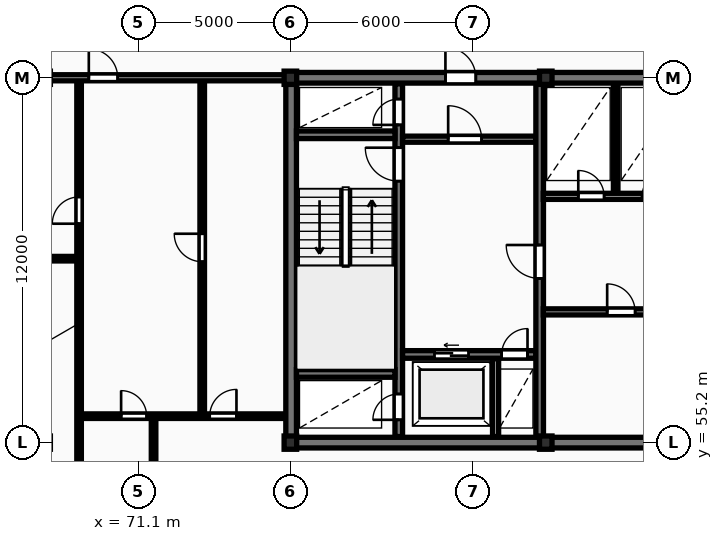
"""IFC4 building model, lengths in metres.
Left out: names, types, materials, properties, quantities, classifications, styles, units other than length and angle.
Written with IfcOpenShell. Run it as: python <this file> out.ifc"""

import sys

from ifc_helpers import new_model, si_unit, direction, frame, frame_2d, origin, origin_2d, place, context, subcontext, project, spatial, rectangle, i_section, extrude, element, fill, save


model = new_model("IFC4")
c1 = context("Model", 3, precision=1e-05, world=origin(), true_north=direction((0.0, 1.0)))
c2 = subcontext(c1, "Body", "Model", "MODEL_VIEW")
j1 = project(units=[si_unit("LENGTHUNIT", "METRE"), si_unit("PLANEANGLEUNIT", "RADIAN")], contexts=[c1])
p1 = place(None, origin())
s1 = spatial("IfcSite", under=j1, at=p1, CompositionType="ELEMENT")
p2 = place(p1, origin())
s2 = spatial("IfcBuilding", under=s1, at=p2, CompositionType="ELEMENT")
p3 = place(p2, frame((0.0, 0.0, 150.1)))
s3 = spatial("IfcBuildingStorey", under=s2, at=p3, CompositionType="ELEMENT", Elevation=150.1)
for number, where, z_axis, x_axis in (
    (1, (76.1, 55.2, 0.0), (0.0, 0.0, 1.0), (1.0, 0.0, 0.0)),
    (2, (76.1, 67.2, 0.0), (0.0, 0.0, 1.0), (1.0, 0.0, 0.0)),
    (3, (84.5, 55.2, 0.0), (0.0, 0.0, 1.0), (1.0, 0.0, 0.0)),
    (4, (84.5, 67.2, 0.0), (0.0, 0.0, 1.0), (1.0, 0.0, 0.0)),
):
    element("IfcColumn", number, at=place(p3, frame(where, z_axis=z_axis, x_axis=x_axis)), inside=s3, PredefinedType="COLUMN", context=c2, shape_type="SweptSolid", body=[
        extrude(i_section(OverallWidth=0.412, OverallDepth=0.437, WebThickness=0.036, FlangeThickness=0.052, FilletRadius=0.015, at=origin_2d()), origin(), (0.0, 0.0, 1.0), 3.6),
    ])
p4 = place(p3, frame((75.95, 55.2, 0.0), z_axis=(0.0, 0.0, 1.0), x_axis=(1.0, 0.0, 0.0)))
e5 = element("IfcWall", 5, at=p4, inside=s3, PredefinedType="SHEAR", context=c2, shape_type="SweptSolid", body=[
    extrude(rectangle(XDim=36.3, YDim=0.35, at=frame_2d((18.15, 0.0))), origin(), (0.0, 0.0, 1.0), 3.6),
])
p5 = place(p4, frame((15.1, 0.0, 0.0)))
e6 = element("IfcOpeningElement", 6, at=p5, cuts=e5, PredefinedType="OPENING", context=c2, shape_type="SweptSolid", body=[
    extrude(rectangle(XDim=1.1, YDim=2.1, at=frame_2d((0.55, 1.05))), frame((0.0, 0.185, 0.0), z_axis=(0.0, -1.0, 0.0), x_axis=(1.0, 0.0, 0.0)), (0.0, 0.0, 1.0), 0.37),
])
p6 = place(p3, frame((76.125, 55.375, 0.0), z_axis=(0.0, 0.0, 1.0), x_axis=(0.0, 1.0, 0.0)))
e7 = element("IfcWall", 7, at=p6, inside=s3, PredefinedType="SHEAR", context=c2, shape_type="SweptSolid", body=[
    extrude(rectangle(XDim=11.65, YDim=0.35, at=frame_2d((5.825, 0.0))), origin(), (0.0, 0.0, 1.0), 3.6),
])
p7 = place(p3, frame((75.95, 67.2, 0.0), z_axis=(0.0, 0.0, 1.0), x_axis=(1.0, 0.0, 0.0)))
e8 = element("IfcWall", 8, at=p7, inside=s3, PredefinedType="SHEAR", context=c2, shape_type="SweptSolid", body=[
    extrude(rectangle(XDim=36.3, YDim=0.35, at=frame_2d((18.15, 0.0))), origin(), (0.0, 0.0, 1.0), 3.6),
])
p8 = place(p7, frame((5.25, 0.0, 0.0)))
e9 = element("IfcOpeningElement", 9, at=p8, cuts=e8, PredefinedType="OPENING", context=c2, shape_type="SweptSolid", body=[
    extrude(rectangle(XDim=1.0, YDim=2.15, at=frame_2d((0.5, 1.075))), frame((0.0, 0.185, 0.0), z_axis=(0.0, -1.0, 0.0), x_axis=(1.0, 0.0, 0.0)), (0.0, 0.0, 1.0), 0.37),
])
p9 = place(p7, frame((21.6, 0.0, 0.0)))
e10 = element("IfcOpeningElement", 10, at=p9, cuts=e8, PredefinedType="OPENING", context=c2, shape_type="SweptSolid", body=[
    extrude(rectangle(XDim=1.5, YDim=2.2, at=frame_2d((0.75, 1.1))), frame((0.0, 0.185, 0.0), z_axis=(0.0, -1.0, 0.0), x_axis=(1.0, 0.0, 0.0)), (0.0, 0.0, 1.0), 0.37),
])
p10 = place(p7, frame((30.45, 0.0, 0.0)))
e11 = element("IfcOpeningElement", 11, at=p10, cuts=e8, PredefinedType="OPENING", context=c2, shape_type="SweptSolid", body=[
    extrude(rectangle(XDim=1.0, YDim=2.15, at=frame_2d((0.5, 1.075))), frame((0.0, 0.185, 0.0), z_axis=(0.0, -1.0, 0.0), x_axis=(1.0, 0.0, 0.0)), (0.0, 0.0, 1.0), 0.37),
])
p11 = place(p3, frame((79.665, 55.4, 0.0), z_axis=(0.0, 0.0, 1.0), x_axis=(0.0, 1.0, 0.0)))
e12 = element("IfcWall", 12, at=p11, inside=s3, PredefinedType="SHEAR", context=c2, shape_type="SweptSolid", body=[
    extrude(rectangle(XDim=11.6, YDim=0.25, at=frame_2d((5.8, 0.0))), origin(), (0.0, 0.0, 1.0), 3.6),
])
p12 = place(p11, frame((0.55, 0.0, 0.0)))
e13 = element("IfcOpeningElement", 13, at=p12, cuts=e12, PredefinedType="OPENING", context=c2, shape_type="SweptSolid", body=[
    extrude(rectangle(XDim=0.85, YDim=2.05, at=frame_2d((0.425, 1.025))), frame((0.0, 0.135, 0.0), z_axis=(0.0, -1.0, 0.0), x_axis=(1.0, 0.0, 0.0)), (0.0, 0.0, 1.0), 0.27),
])
p13 = place(p11, frame((8.4, 0.0, 0.0)))
e14 = element("IfcOpeningElement", 14, at=p13, cuts=e12, PredefinedType="OPENING", context=c2, shape_type="SweptSolid", body=[
    extrude(rectangle(XDim=1.1, YDim=2.1, at=frame_2d((0.55, 1.05))), frame((0.0, 0.135, 0.0), z_axis=(0.0, -1.0, 0.0), x_axis=(1.0, 0.0, 0.0)), (0.0, 0.0, 1.0), 0.27),
])
p14 = place(p11, frame((10.25, 0.0, 0.0)))
e15 = element("IfcOpeningElement", 15, at=p14, cuts=e12, PredefinedType="OPENING", context=c2, shape_type="SweptSolid", body=[
    extrude(rectangle(XDim=0.85, YDim=2.05, at=frame_2d((0.425, 1.025))), frame((0.0, 0.135, 0.0), z_axis=(0.0, -1.0, 0.0), x_axis=(1.0, 0.0, 0.0)), (0.0, 0.0, 1.0), 0.27),
])
for number, where, z_axis, x_axis in (
    (16, (76.3, 57.475, 0.0), (0.0, 0.0, 1.0), (1.0, 0.0, 0.0)),
    (17, (76.3, 65.325, 0.0), (0.0, 0.0, 1.0), (1.0, 0.0, 0.0)),
):
    element("IfcWall", number, at=place(p3, frame(where, z_axis=z_axis, x_axis=x_axis)), inside=s3, PredefinedType="SHEAR", context=c2, shape_type="SweptSolid", body=[
        extrude(rectangle(XDim=3.24, YDim=0.25, at=frame_2d((1.62, 0.0))), origin(), (0.0, 0.0, 1.0), 3.6),
    ])
p15 = place(p3, frame((79.79, 58.1, 0.0), z_axis=(0.0, 0.0, 1.0), x_axis=(1.0, 0.0, 0.0)))
e18 = element("IfcWall", 18, at=p15, inside=s3, PredefinedType="SHEAR", context=c2, shape_type="SweptSolid", body=[
    extrude(rectangle(XDim=4.39, YDim=0.25, at=frame_2d((2.195, 0.0))), origin(), (0.0, 0.0, 1.0), 3.6),
])
p16 = place(p15, frame((1.05, 0.0, 0.0)))
e19 = element("IfcOpeningElement", 19, at=p16, cuts=e18, PredefinedType="OPENING", context=c2, shape_type="SweptSolid", body=[
    extrude(rectangle(XDim=1.12, YDim=2.12, at=frame_2d((0.56, 1.06))), frame((0.0, 0.135, 0.0), z_axis=(0.0, -1.0, 0.0), x_axis=(1.0, 0.0, 0.0)), (0.0, 0.0, 1.0), 0.27),
])
p17 = place(p15, frame((3.26, 0.0, 0.0)))
e20 = element("IfcOpeningElement", 20, at=p17, cuts=e18, PredefinedType="OPENING", context=c2, shape_type="SweptSolid", body=[
    extrude(rectangle(XDim=0.85, YDim=2.05, at=frame_2d((0.425, 1.025))), frame((0.0, 0.135, 0.0), z_axis=(0.0, -1.0, 0.0), x_axis=(1.0, 0.0, 0.0)), (0.0, 0.0, 1.0), 0.27),
])
p18 = place(p3, frame((82.85, 55.4, 0.0), z_axis=(0.0, 0.0, 1.0), x_axis=(0.0, 1.0, 0.0)))
e21 = element("IfcWall", 21, at=p18, inside=s3, PredefinedType="PARTITIONING", context=c2, shape_type="SweptSolid", body=[
    extrude(rectangle(XDim=2.56, YDim=0.2, at=frame_2d((1.28, 0.0))), origin(), (0.0, 0.0, 1.0), 3.31),
])
p19 = place(p3, frame((79.79, 65.18, 0.0), z_axis=(0.0, 0.0, 1.0), x_axis=(1.0, 0.0, 0.0)))
e22 = element("IfcWall", 22, at=p19, inside=s3, PredefinedType="PARTITIONING", context=c2, shape_type="SweptSolid", body=[
    extrude(rectangle(XDim=4.39, YDim=0.2, at=frame_2d((2.195, 0.0))), origin(), (0.0, 0.0, 1.0), 3.31),
])
p20 = place(p19, frame((1.5, 0.0, 0.0)))
e23 = element("IfcOpeningElement", 23, at=p20, cuts=e22, PredefinedType="OPENING", context=c2, shape_type="SweptSolid", body=[
    extrude(rectangle(XDim=1.1, YDim=2.1, at=frame_2d((0.55, 1.05))), frame((0.0, 0.11, 0.0), z_axis=(0.0, -1.0, 0.0), x_axis=(1.0, 0.0, 0.0)), (0.0, 0.0, 1.0), 0.22),
])
p21 = place(p3, frame((84.3, 55.4, 0.0), z_axis=(0.0, 0.0, 1.0), x_axis=(0.0, 1.0, 0.0)))
e24 = element("IfcWall", 24, at=p21, inside=s3, PredefinedType="SHEAR", context=c2, shape_type="SweptSolid", body=[
    extrude(rectangle(XDim=11.6, YDim=0.25, at=frame_2d((5.8, 0.0))), origin(), (0.0, 0.0, 1.0), 3.6),
])
p22 = place(p21, frame((5.2, 0.0, 0.0)))
e25 = element("IfcOpeningElement", 25, at=p22, cuts=e24, PredefinedType="OPENING", context=c2, shape_type="SweptSolid", body=[
    extrude(rectangle(XDim=1.1, YDim=2.1, at=frame_2d((0.55, 1.05))), frame((0.0, 0.135, 0.0), z_axis=(0.0, -1.0, 0.0), x_axis=(1.0, 0.0, 0.0)), (0.0, 0.0, 1.0), 0.27),
])
p23 = place(p3, frame((84.42, 59.5, 0.0), z_axis=(0.0, 0.0, 1.0), x_axis=(1.0, 0.0, 0.0)))
e26 = element("IfcWall", 26, at=p23, inside=s3, PredefinedType="PARTITIONING", context=c2, shape_type="SweptSolid", body=[
    extrude(rectangle(XDim=8.36, YDim=0.2, at=frame_2d((4.18, 0.0))), origin(), (0.0, 0.0, 1.0), 3.31),
])
p24 = place(p23, frame((2.1, 0.0, 0.0)))
e27 = element("IfcOpeningElement", 27, at=p24, cuts=e26, PredefinedType="OPENING", context=c2, shape_type="SweptSolid", body=[
    extrude(rectangle(XDim=0.92, YDim=2.08, at=frame_2d((0.46, 1.04))), frame((0.0, 0.11, 0.0), z_axis=(0.0, -1.0, 0.0), x_axis=(1.0, 0.0, 0.0)), (0.0, 0.0, 1.0), 0.22),
])
p25 = place(p23, frame((6.38, 0.0, 0.0)))
e28 = element("IfcOpeningElement", 28, at=p25, cuts=e26, PredefinedType="OPENING", context=c2, shape_type="SweptSolid", body=[
    extrude(rectangle(XDim=1.1, YDim=2.1, at=frame_2d((0.55, 1.05))), frame((0.0, 0.11, 0.0), z_axis=(0.0, -1.0, 0.0), x_axis=(1.0, 0.0, 0.0)), (0.0, 0.0, 1.0), 0.22),
])
p26 = place(p3, frame((86.8, 63.4, 0.0), z_axis=(0.0, 0.0, 1.0), x_axis=(0.0, 1.0, 0.0)))
e29 = element("IfcWall", 29, at=p26, inside=s3, PredefinedType="PARTITIONING", context=c2, shape_type="SweptSolid", body=[
    extrude(rectangle(XDim=3.6, YDim=0.15, at=frame_2d((1.8, 0.0))), origin(), (0.0, 0.0, 1.0), 3.31),
])
p27 = place(p3, frame((84.42, 63.3, 0.0), z_axis=(0.0, 0.0, 1.0), x_axis=(1.0, 0.0, 0.0)))
e30 = element("IfcWall", 30, at=p27, inside=s3, PredefinedType="PARTITIONING", context=c2, shape_type="SweptSolid", body=[
    extrude(rectangle(XDim=19.83, YDim=0.2, at=frame_2d((9.915, 0.0))), origin(), (0.0, 0.0, 1.0), 3.31),
])
p28 = place(p27, frame((1.15, 0.0, 0.0)))
e31 = element("IfcOpeningElement", 31, at=p28, cuts=e30, PredefinedType="OPENING", context=c2, shape_type="SweptSolid", body=[
    extrude(rectangle(XDim=0.85, YDim=2.05, at=frame_2d((0.425, 1.025))), frame((0.0, 0.11, 0.0), z_axis=(0.0, -1.0, 0.0), x_axis=(1.0, 0.0, 0.0)), (0.0, 0.0, 1.0), 0.22),
])
p29 = place(p27, frame((3.25, 0.0, 0.0)))
e32 = element("IfcOpeningElement", 32, at=p29, cuts=e30, PredefinedType="OPENING", context=c2, shape_type="SweptSolid", body=[
    extrude(rectangle(XDim=0.85, YDim=2.05, at=frame_2d((0.425, 1.025))), frame((0.0, 0.11, 0.0), z_axis=(0.0, -1.0, 0.0), x_axis=(1.0, 0.0, 0.0)), (0.0, 0.0, 1.0), 0.22),
])
p30 = place(p27, frame((13.08, 0.0, 0.0)))
e33 = element("IfcOpeningElement", 33, at=p30, cuts=e30, PredefinedType="OPENING", context=c2, shape_type="SweptSolid", body=[
    extrude(rectangle(XDim=1.5, YDim=2.2, at=frame_2d((0.75, 1.1))), frame((0.0, 0.11, 0.0), z_axis=(0.0, -1.0, 0.0), x_axis=(1.0, 0.0, 0.0)), (0.0, 0.0, 1.0), 0.22),
])
p31 = place(p27, frame((5.53, 0.0, 0.0)))
e34 = element("IfcOpeningElement", 34, at=p31, cuts=e30, PredefinedType="OPENING", context=c2, shape_type="SweptSolid", body=[
    extrude(rectangle(XDim=0.88, YDim=2.06, at=frame_2d((0.44, 1.03))), frame((0.0, 0.11, 0.0), z_axis=(0.0, -1.0, 0.0), x_axis=(1.0, 0.0, 0.0)), (0.0, 0.0, 1.0), 0.22),
])
p32 = place(p27, frame((7.68, 0.0, 0.0)))
e35 = element("IfcOpeningElement", 35, at=p32, cuts=e30, PredefinedType="OPENING", context=c2, shape_type="SweptSolid", body=[
    extrude(rectangle(XDim=0.88, YDim=2.06, at=frame_2d((0.44, 1.03))), frame((0.0, 0.11, 0.0), z_axis=(0.0, -1.0, 0.0), x_axis=(1.0, 0.0, 0.0)), (0.0, 0.0, 1.0), 0.22),
])
p33 = place(p27, frame((10.43, 0.0, 0.0)))
e36 = element("IfcOpeningElement", 36, at=p33, cuts=e30, PredefinedType="OPENING", context=c2, shape_type="SweptSolid", body=[
    extrude(rectangle(XDim=0.85, YDim=2.05, at=frame_2d((0.425, 1.025))), frame((0.0, 0.11, 0.0), z_axis=(0.0, -1.0, 0.0), x_axis=(1.0, 0.0, 0.0)), (0.0, 0.0, 1.0), 0.22),
])
p34 = place(p27, frame((16.23, 0.0, 0.0)))
e37 = element("IfcOpeningElement", 37, at=p34, cuts=e30, PredefinedType="OPENING", context=c2, shape_type="SweptSolid", body=[
    extrude(rectangle(XDim=0.96, YDim=2.1, at=frame_2d((0.48, 1.05))), frame((0.0, 0.11, 0.0), z_axis=(0.0, -1.0, 0.0), x_axis=(1.0, 0.0, 0.0)), (0.0, 0.0, 1.0), 0.22),
])
p35 = place(p27, frame((18.68, 0.0, 0.0)))
e38 = element("IfcOpeningElement", 38, at=p35, cuts=e30, PredefinedType="OPENING", context=c2, shape_type="SweptSolid", body=[
    extrude(rectangle(XDim=0.84, YDim=2.04, at=frame_2d((0.42, 1.02))), frame((0.0, 0.11, 0.0), z_axis=(0.0, -1.0, 0.0), x_axis=(1.0, 0.0, 0.0)), (0.0, 0.0, 1.0), 0.22),
])
p36 = place(p3, frame((57.6, 61.25, 0.0), z_axis=(0.0, 0.0, 1.0), x_axis=(1.0, 0.0, 0.0)))
e39 = element("IfcWall", 39, at=p36, inside=s3, PredefinedType="PARTITIONING", context=c2, shape_type="SweptSolid", body=[
    extrude(rectangle(XDim=11.55, YDim=0.15, at=frame_2d((5.775, 0.0))), origin(), (0.0, 0.0, 1.0), 3.31),
])
p37 = place(p36, frame((5.355, 0.0, 0.0)))
e40 = element("IfcOpeningElement", 40, at=p37, cuts=e39, PredefinedType="OPENING", context=c2, shape_type="SweptSolid", body=[
    extrude(rectangle(XDim=0.84, YDim=2.04, at=frame_2d((0.42, 1.02))), frame((0.0, 0.085, 0.0), z_axis=(0.0, -1.0, 0.0), x_axis=(1.0, 0.0, 0.0)), (0.0, 0.0, 1.0), 0.17),
])
p38 = place(p3, frame((69.15, 51.1, 0.0), z_axis=(0.0, 0.0, 1.0), x_axis=(0.0, 1.0, 0.0)))
e41 = element("IfcWall", 41, at=p38, inside=s3, PredefinedType="PARTITIONING", context=c2, shape_type="SweptSolid", body=[
    extrude(rectangle(XDim=16.05, YDim=0.15, at=frame_2d((8.025, 0.0))), origin(), (0.0, 0.0, 1.0), 3.31),
])
p39 = place(p38, frame((11.3, 0.0, 0.0)))
e42 = element("IfcOpeningElement", 42, at=p39, cuts=e41, PredefinedType="OPENING", context=c2, shape_type="SweptSolid", body=[
    extrude(rectangle(XDim=0.88, YDim=2.06, at=frame_2d((0.44, 1.03))), frame((0.0, 0.085, 0.0), z_axis=(0.0, -1.0, 0.0), x_axis=(1.0, 0.0, 0.0)), (0.0, 0.0, 1.0), 0.17),
])
p40 = place(p3, frame((73.2, 56.07, 0.0), z_axis=(0.0, 0.0, 1.0), x_axis=(0.0, 1.0, 0.0)))
e43 = element("IfcWall", 43, at=p40, inside=s3, PredefinedType="PARTITIONING", context=c2, shape_type="SweptSolid", body=[
    extrude(rectangle(XDim=11.08, YDim=0.15, at=frame_2d((5.54, 0.0))), origin(), (0.0, 0.0, 1.0), 3.31),
])
p41 = place(p40, frame((5.08, 0.0, 0.0)))
e44 = element("IfcOpeningElement", 44, at=p41, cuts=e43, PredefinedType="OPENING", context=c2, shape_type="SweptSolid", body=[
    extrude(rectangle(XDim=0.92, YDim=2.08, at=frame_2d((0.46, 1.04))), frame((0.0, 0.085, 0.0), z_axis=(0.0, -1.0, 0.0), x_axis=(1.0, 0.0, 0.0)), (0.0, 0.0, 1.0), 0.17),
])
p42 = place(p3, frame((71.6, 51.1, 0.0), z_axis=(0.0, 0.0, 1.0), x_axis=(0.0, 1.0, 0.0)))
e45 = element("IfcWall", 45, at=p42, inside=s3, PredefinedType="PARTITIONING", context=c2, shape_type="SweptSolid", body=[
    extrude(rectangle(XDim=4.97, YDim=0.15, at=frame_2d((2.485, 0.0))), origin(), (0.0, 0.0, 1.0), 3.31),
])
p43 = place(p3, frame((69.17, 56.07, 0.0), z_axis=(0.0, 0.0, 1.0), x_axis=(1.0, 0.0, 0.0)))
e46 = element("IfcWall", 46, at=p43, inside=s3, PredefinedType="PARTITIONING", context=c2, shape_type="SweptSolid", body=[
    extrude(rectangle(XDim=6.76, YDim=0.15, at=frame_2d((3.38, 0.0))), origin(), (0.0, 0.0, 1.0), 3.31),
])
p44 = place(p43, frame((1.362, 0.0, 0.0)))
e47 = element("IfcOpeningElement", 47, at=p44, cuts=e46, PredefinedType="OPENING", context=c2, shape_type="SweptSolid", body=[
    extrude(rectangle(XDim=0.84, YDim=2.04, at=frame_2d((0.42, 1.02))), frame((0.0, 0.085, 0.0), z_axis=(0.0, -1.0, 0.0), x_axis=(1.0, 0.0, 0.0)), (0.0, 0.0, 1.0), 0.17),
])
p45 = place(p43, frame((4.277, 0.0, 0.0)))
e48 = element("IfcOpeningElement", 48, at=p45, cuts=e46, PredefinedType="OPENING", context=c2, shape_type="SweptSolid", body=[
    extrude(rectangle(XDim=0.88, YDim=2.06, at=frame_2d((0.44, 1.03))), frame((0.0, 0.085, 0.0), z_axis=(0.0, -1.0, 0.0), x_axis=(1.0, 0.0, 0.0)), (0.0, 0.0, 1.0), 0.17),
])
p46 = place(p3, frame((57.6, 67.2, 0.0), z_axis=(0.0, 0.0, 1.0), x_axis=(1.0, 0.0, 0.0)))
e49 = element("IfcWall", 49, at=p46, inside=s3, PredefinedType="PARTITIONING", context=c2, shape_type="SweptSolid", body=[
    extrude(rectangle(XDim=18.35, YDim=0.2, at=frame_2d((9.175, 0.0))), origin(), (0.0, 0.0, 1.0), 2.773),
])
p47 = place(p46, frame((11.87, 0.0, 0.0)))
e50 = element("IfcOpeningElement", 50, at=p47, cuts=e49, PredefinedType="OPENING", context=c2, shape_type="SweptSolid", body=[
    extrude(rectangle(XDim=0.95, YDim=2.15, at=frame_2d((0.475, 1.075))), frame((0.0, 0.11, 0.0), z_axis=(0.0, -1.0, 0.0), x_axis=(1.0, 0.0, 0.0)), (0.0, 0.0, 1.0), 0.22),
])
p48 = place(p8, origin())
e51 = element("IfcDoor", 51, at=p48, inside=s3, OperationType="SINGLE_SWING_LEFT", PredefinedType="DOOR", context=c2, shape_type="SweptSolid", body=[
    extrude(rectangle(XDim=1.0, YDim=2.15, at=frame_2d((0.5, 1.075))), frame((0.0, 0.025, 0.0), z_axis=(0.0, -1.0, 0.0), x_axis=(1.0, 0.0, 0.0)), (0.0, 0.0, 1.0), 0.05),
])
fill(e9, e51)
p49 = place(p12, origin())
e52 = element("IfcDoor", 52, at=p49, inside=s3, OperationType="SINGLE_SWING_LEFT", PredefinedType="DOOR", context=c2, shape_type="SweptSolid", body=[
    extrude(rectangle(XDim=0.85, YDim=2.05, at=frame_2d((0.425, 1.025))), frame((0.0, 0.025, 0.0), z_axis=(0.0, -1.0, 0.0), x_axis=(1.0, 0.0, 0.0)), (0.0, 0.0, 1.0), 0.05),
])
fill(e13, e52)
p50 = place(p13, origin())
e53 = element("IfcDoor", 53, at=p50, inside=s3, OperationType="SINGLE_SWING_RIGHT", PredefinedType="DOOR", context=c2, shape_type="SweptSolid", body=[
    extrude(rectangle(XDim=1.1, YDim=2.1, at=frame_2d((0.55, 1.05))), frame((0.0, 0.025, 0.0), z_axis=(0.0, -1.0, 0.0), x_axis=(1.0, 0.0, 0.0)), (0.0, 0.0, 1.0), 0.05),
])
fill(e14, e53)
p51 = place(p14, origin())
e54 = element("IfcDoor", 54, at=p51, inside=s3, OperationType="SINGLE_SWING_LEFT", PredefinedType="DOOR", context=c2, shape_type="SweptSolid", body=[
    extrude(rectangle(XDim=0.85, YDim=2.05, at=frame_2d((0.425, 1.025))), frame((0.0, 0.025, 0.0), z_axis=(0.0, -1.0, 0.0), x_axis=(1.0, 0.0, 0.0)), (0.0, 0.0, 1.0), 0.05),
])
fill(e15, e54)
p52 = place(p16, origin())
e55 = element("IfcDoor", 55, at=p52, inside=s3, OperationType="SLIDING_TO_LEFT", PredefinedType="DOOR", context=c2, shape_type="SweptSolid", body=[
    extrude(rectangle(XDim=1.12, YDim=2.12, at=frame_2d((0.56, 1.06))), frame((0.0, 0.025, 0.0), z_axis=(0.0, -1.0, 0.0), x_axis=(1.0, 0.0, 0.0)), (0.0, 0.0, 1.0), 0.05),
])
fill(e19, e55)
p53 = place(p17, origin())
e56 = element("IfcDoor", 56, at=p53, inside=s3, OperationType="SINGLE_SWING_RIGHT", PredefinedType="DOOR", context=c2, shape_type="SweptSolid", body=[
    extrude(rectangle(XDim=0.85, YDim=2.05, at=frame_2d((0.425, 1.025))), frame((0.0, 0.025, 0.0), z_axis=(0.0, -1.0, 0.0), x_axis=(1.0, 0.0, 0.0)), (0.0, 0.0, 1.0), 0.05),
])
fill(e20, e56)
p54 = place(p20, origin())
e57 = element("IfcDoor", 57, at=p54, inside=s3, OperationType="SINGLE_SWING_LEFT", PredefinedType="DOOR", context=c2, shape_type="SweptSolid", body=[
    extrude(rectangle(XDim=1.1, YDim=2.1, at=frame_2d((0.55, 1.05))), frame((0.0, 0.025, 0.0), z_axis=(0.0, -1.0, 0.0), x_axis=(1.0, 0.0, 0.0)), (0.0, 0.0, 1.0), 0.05),
])
fill(e23, e57)
p55 = place(p22, origin())
e58 = element("IfcDoor", 58, at=p55, inside=s3, OperationType="SINGLE_SWING_RIGHT", PredefinedType="DOOR", context=c2, shape_type="SweptSolid", body=[
    extrude(rectangle(XDim=1.1, YDim=2.1, at=frame_2d((0.55, 1.05))), frame((0.0, 0.025, 0.0), z_axis=(0.0, -1.0, 0.0), x_axis=(1.0, 0.0, 0.0)), (0.0, 0.0, 1.0), 0.05),
])
fill(e25, e58)
p56 = place(p24, origin())
e59 = element("IfcDoor", 59, at=p56, inside=s3, OperationType="SINGLE_SWING_LEFT", PredefinedType="DOOR", context=c2, shape_type="SweptSolid", body=[
    extrude(rectangle(XDim=0.92, YDim=2.08, at=frame_2d((0.46, 1.04))), frame((0.0, 0.025, 0.0), z_axis=(0.0, -1.0, 0.0), x_axis=(1.0, 0.0, 0.0)), (0.0, 0.0, 1.0), 0.05),
])
fill(e27, e59)
p57 = place(p28, origin())
e60 = element("IfcDoor", 60, at=p57, inside=s3, OperationType="SINGLE_SWING_LEFT", PredefinedType="DOOR", context=c2, shape_type="SweptSolid", body=[
    extrude(rectangle(XDim=0.85, YDim=2.05, at=frame_2d((0.425, 1.025))), frame((0.0, 0.025, 0.0), z_axis=(0.0, -1.0, 0.0), x_axis=(1.0, 0.0, 0.0)), (0.0, 0.0, 1.0), 0.05),
])
fill(e31, e60)
p58 = place(p29, origin())
e61 = element("IfcDoor", 61, at=p58, inside=s3, OperationType="SINGLE_SWING_RIGHT", PredefinedType="DOOR", context=c2, shape_type="SweptSolid", body=[
    extrude(rectangle(XDim=0.85, YDim=2.05, at=frame_2d((0.425, 1.025))), frame((0.0, 0.025, 0.0), z_axis=(0.0, -1.0, 0.0), x_axis=(1.0, 0.0, 0.0)), (0.0, 0.0, 1.0), 0.05),
])
fill(e32, e61)
p59 = place(p39, origin())
e62 = element("IfcDoor", 62, at=p59, inside=s3, OperationType="SINGLE_SWING_LEFT", PredefinedType="DOOR", context=c2, shape_type="SweptSolid", body=[
    extrude(rectangle(XDim=0.88, YDim=2.06, at=frame_2d((0.44, 1.03))), frame((0.0, 0.025, 0.0), z_axis=(0.0, -1.0, 0.0), x_axis=(1.0, 0.0, 0.0)), (0.0, 0.0, 1.0), 0.05),
])
fill(e42, e62)
p60 = place(p41, origin())
e63 = element("IfcDoor", 63, at=p60, inside=s3, OperationType="SINGLE_SWING_RIGHT", PredefinedType="DOOR", context=c2, shape_type="SweptSolid", body=[
    extrude(rectangle(XDim=0.92, YDim=2.08, at=frame_2d((0.46, 1.04))), frame((0.0, 0.025, 0.0), z_axis=(0.0, -1.0, 0.0), x_axis=(1.0, 0.0, 0.0)), (0.0, 0.0, 1.0), 0.05),
])
fill(e44, e63)
p61 = place(p44, origin())
e64 = element("IfcDoor", 64, at=p61, inside=s3, OperationType="SINGLE_SWING_LEFT", PredefinedType="DOOR", context=c2, shape_type="SweptSolid", body=[
    extrude(rectangle(XDim=0.84, YDim=2.04, at=frame_2d((0.42, 1.02))), frame((0.0, 0.025, 0.0), z_axis=(0.0, -1.0, 0.0), x_axis=(1.0, 0.0, 0.0)), (0.0, 0.0, 1.0), 0.05),
])
fill(e47, e64)
p62 = place(p45, origin())
e65 = element("IfcDoor", 65, at=p62, inside=s3, OperationType="SINGLE_SWING_RIGHT", PredefinedType="DOOR", context=c2, shape_type="SweptSolid", body=[
    extrude(rectangle(XDim=0.88, YDim=2.06, at=frame_2d((0.44, 1.03))), frame((0.0, 0.025, 0.0), z_axis=(0.0, -1.0, 0.0), x_axis=(1.0, 0.0, 0.0)), (0.0, 0.0, 1.0), 0.05),
])
fill(e48, e65)
p63 = place(p47, origin())
e66 = element("IfcDoor", 66, at=p63, inside=s3, OperationType="SINGLE_SWING_LEFT", PredefinedType="DOOR", context=c2, shape_type="SweptSolid", body=[
    extrude(rectangle(XDim=0.95, YDim=2.15, at=frame_2d((0.475, 1.075))), frame((0.0, 0.025, 0.0), z_axis=(0.0, -1.0, 0.0), x_axis=(1.0, 0.0, 0.0)), (0.0, 0.0, 1.0), 0.05),
])
fill(e50, e66)
save(model, sys.argv[1])
